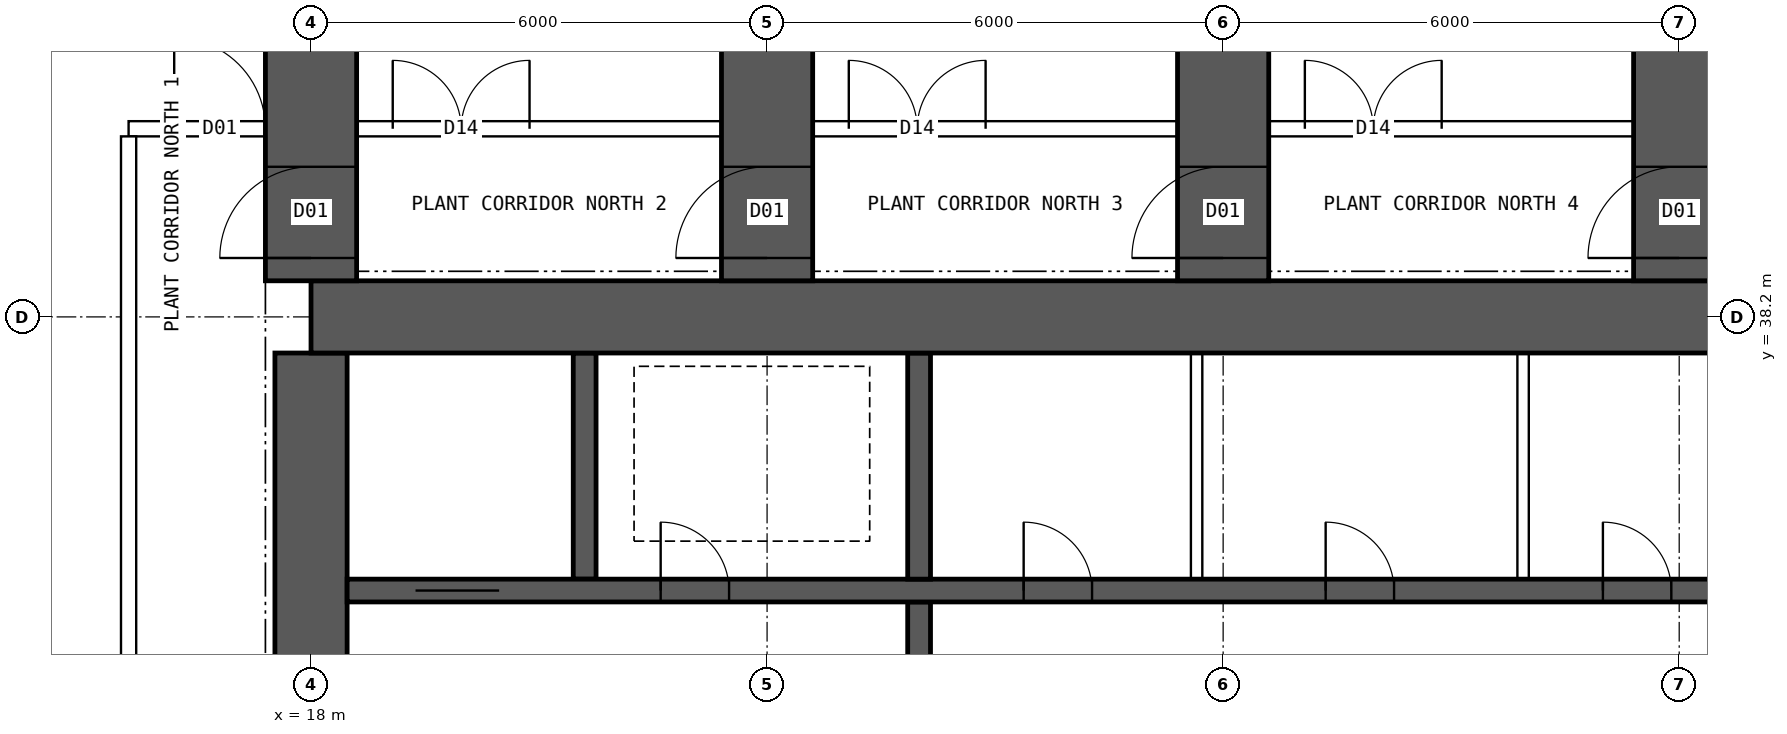
"""IFC4 building model, lengths in metres.
Left out: names, types, materials, properties, quantities, classifications, styles, units other than length and angle.
Written with IfcOpenShell. Run it as: python <this file> out.ifc"""

import sys

from ifc_helpers import new_model, si_unit, direction, frame, frame_2d, origin, place, context, subcontext, project, spatial, rectangle, extrude, element, fill, save


model = new_model("IFC4")
c1 = context("Model", 3, precision=1e-05, world=origin(), true_north=direction((0.0, 1.0)))
c2 = subcontext(c1, "Body", "Model", "MODEL_VIEW")
j1 = project(units=[si_unit("LENGTHUNIT", "METRE"), si_unit("PLANEANGLEUNIT", "RADIAN")], contexts=[c1])
p1 = place(None, origin())
s1 = spatial("IfcSite", under=j1, at=p1, CompositionType="ELEMENT")
p2 = place(p1, origin())
s2 = spatial("IfcBuilding", under=s1, at=p2, CompositionType="ELEMENT")
p3 = place(p2, frame((0.0, 0.0, 133.15)))
s3 = spatial("IfcBuildingStorey", under=s2, at=p3, CompositionType="ELEMENT", Elevation=133.15)
p4 = place(p3, frame((18.0, 38.2, 0.0), z_axis=(0.0, 0.0, 1.0), x_axis=(1.0, 0.0, 0.0)))
e1 = element("IfcWall", 1, at=p4, inside=s3, PredefinedType="SHEAR", context=c2, shape_type="SweptSolid", body=[
    extrude(rectangle(XDim=48.0, YDim=0.95, at=frame_2d((24.0, 0.0))), origin(), (0.0, 0.0, 1.0), 7.2),
])
p5 = place(p3, frame((18.0, 26.275, 0.0), z_axis=(0.0, 0.0, 1.0), x_axis=(0.0, 1.0, 0.0)))
e2 = element("IfcWall", 2, at=p5, inside=s3, PredefinedType="SHEAR", context=c2, shape_type="SweptSolid", body=[
    extrude(rectangle(XDim=11.45, YDim=0.95, at=frame_2d((5.725, 0.0))), origin(), (0.0, 0.0, 1.0), 7.2),
])
p6 = place(p5, frame((5.025, 0.0, 0.0)))
e3 = element("IfcOpeningElement", 3, at=p6, cuts=e2, PredefinedType="OPENING", context=c2, shape_type="SweptSolid", body=[
    extrude(rectangle(XDim=1.2, YDim=2.1, at=frame_2d((0.6, 1.05))), frame((0.0, 0.485, 0.0), z_axis=(0.0, -1.0, 0.0), x_axis=(1.0, 0.0, 0.0)), (0.0, 0.0, 1.0), 0.97),
])
p7 = place(p3, frame((18.475, 34.6, 0.0), z_axis=(0.0, 0.0, 1.0), x_axis=(1.0, 0.0, 0.0)))
e4 = element("IfcWall", 4, at=p7, inside=s3, PredefinedType="SHEAR", context=c2, shape_type="SweptSolid", body=[
    extrude(rectangle(XDim=47.05, YDim=0.3, at=frame_2d((23.525, 0.0))), origin(), (0.0, 0.0, 1.0), 7.2),
])
p8 = place(p7, frame((0.9, 0.0, 0.0)))
e5 = element("IfcOpeningElement", 5, at=p8, cuts=e4, PredefinedType="OPENING", context=c2, shape_type="SweptSolid", body=[
    extrude(rectangle(XDim=1.1, YDim=2.1, at=frame_2d((0.55, 1.05))), frame((0.0, 0.16, 0.0), z_axis=(0.0, -1.0, 0.0), x_axis=(1.0, 0.0, 0.0)), (0.0, 0.0, 1.0), 0.32),
])
p9 = place(p7, frame((45.05, 0.0, 0.0)))
e6 = element("IfcOpeningElement", 6, at=p9, cuts=e4, PredefinedType="OPENING", context=c2, shape_type="SweptSolid", body=[
    extrude(rectangle(XDim=1.1, YDim=2.1, at=frame_2d((0.55, 1.05))), frame((0.0, 0.16, 0.0), z_axis=(0.0, -1.0, 0.0), x_axis=(1.0, 0.0, 0.0)), (0.0, 0.0, 1.0), 0.32),
])
p10 = place(p7, frame((4.125, 0.0, 0.0)))
e7 = element("IfcOpeningElement", 7, at=p10, cuts=e4, PredefinedType="OPENING", context=c2, shape_type="SweptSolid", body=[
    extrude(rectangle(XDim=0.9, YDim=2.1, at=frame_2d((0.45, 1.05))), frame((0.0, 0.16, 0.0), z_axis=(0.0, -1.0, 0.0), x_axis=(1.0, 0.0, 0.0)), (0.0, 0.0, 1.0), 0.32),
])
p11 = place(p7, frame((42.025, 0.0, 0.0)))
e8 = element("IfcOpeningElement", 8, at=p11, cuts=e4, PredefinedType="OPENING", context=c2, shape_type="SweptSolid", body=[
    extrude(rectangle(XDim=0.9, YDim=2.1, at=frame_2d((0.45, 1.05))), frame((0.0, 0.16, 0.0), z_axis=(0.0, -1.0, 0.0), x_axis=(1.0, 0.0, 0.0)), (0.0, 0.0, 1.0), 0.32),
])
p12 = place(p7, frame((8.9, 0.0, 0.0)))
e9 = element("IfcOpeningElement", 9, at=p12, cuts=e4, PredefinedType="OPENING", context=c2, shape_type="SweptSolid", body=[
    extrude(rectangle(XDim=0.9, YDim=2.1, at=frame_2d((0.45, 1.05))), frame((0.0, 0.16, 0.0), z_axis=(0.0, -1.0, 0.0), x_axis=(1.0, 0.0, 0.0)), (0.0, 0.0, 1.0), 0.32),
])
p13 = place(p7, frame((12.874, 0.0, 0.0)))
e10 = element("IfcOpeningElement", 10, at=p13, cuts=e4, PredefinedType="OPENING", context=c2, shape_type="SweptSolid", body=[
    extrude(rectangle(XDim=0.9, YDim=2.1, at=frame_2d((0.45, 1.05))), frame((0.0, 0.16, 0.0), z_axis=(0.0, -1.0, 0.0), x_axis=(1.0, 0.0, 0.0)), (0.0, 0.0, 1.0), 0.32),
])
p14 = place(p7, frame((16.521, 0.0, 0.0)))
e11 = element("IfcOpeningElement", 11, at=p14, cuts=e4, PredefinedType="OPENING", context=c2, shape_type="SweptSolid", body=[
    extrude(rectangle(XDim=0.9, YDim=2.1, at=frame_2d((0.45, 1.05))), frame((0.0, 0.16, 0.0), z_axis=(0.0, -1.0, 0.0), x_axis=(1.0, 0.0, 0.0)), (0.0, 0.0, 1.0), 0.32),
])
p15 = place(p7, frame((20.28, 0.0, 0.0)))
e12 = element("IfcOpeningElement", 12, at=p15, cuts=e4, PredefinedType="OPENING", context=c2, shape_type="SweptSolid", body=[
    extrude(rectangle(XDim=0.9, YDim=2.1, at=frame_2d((0.45, 1.05))), frame((0.0, 0.16, 0.0), z_axis=(0.0, -1.0, 0.0), x_axis=(1.0, 0.0, 0.0)), (0.0, 0.0, 1.0), 0.32),
])
p16 = place(p7, frame((24.686, 0.0, 0.0)))
e13 = element("IfcOpeningElement", 13, at=p16, cuts=e4, PredefinedType="OPENING", context=c2, shape_type="SweptSolid", body=[
    extrude(rectangle(XDim=0.9, YDim=2.1, at=frame_2d((0.45, 1.05))), frame((0.0, 0.16, 0.0), z_axis=(0.0, -1.0, 0.0), x_axis=(1.0, 0.0, 0.0)), (0.0, 0.0, 1.0), 0.32),
])
p17 = place(p7, frame((27.483, 0.0, 0.0)))
e14 = element("IfcOpeningElement", 14, at=p17, cuts=e4, PredefinedType="OPENING", context=c2, shape_type="SweptSolid", body=[
    extrude(rectangle(XDim=0.9, YDim=2.1, at=frame_2d((0.45, 1.05))), frame((0.0, 0.16, 0.0), z_axis=(0.0, -1.0, 0.0), x_axis=(1.0, 0.0, 0.0)), (0.0, 0.0, 1.0), 0.32),
])
p18 = place(p7, frame((33.604, 0.0, 0.0)))
e15 = element("IfcOpeningElement", 15, at=p18, cuts=e4, PredefinedType="OPENING", context=c2, shape_type="SweptSolid", body=[
    extrude(rectangle(XDim=0.9, YDim=2.1, at=frame_2d((0.45, 1.05))), frame((0.0, 0.16, 0.0), z_axis=(0.0, -1.0, 0.0), x_axis=(1.0, 0.0, 0.0)), (0.0, 0.0, 1.0), 0.32),
])
p19 = place(p3, frame((26.0, 30.55, 0.0), z_axis=(0.0, 0.0, 1.0), x_axis=(0.0, 1.0, 0.0)))
e16 = element("IfcWall", 16, at=p19, inside=s3, PredefinedType="SHEAR", context=c2, shape_type="SweptSolid", body=[
    extrude(rectangle(XDim=3.9, YDim=0.3, at=frame_2d((1.95, 0.0))), origin(), (0.0, 0.0, 1.0), 7.2),
])
p20 = place(p19, frame((1.4, 0.0, 0.0)))
e17 = element("IfcOpeningElement", 17, at=p20, cuts=e16, PredefinedType="OPENING", context=c2, shape_type="SweptSolid", body=[
    extrude(rectangle(XDim=1.2, YDim=2.1, at=frame_2d((0.6, 1.05))), frame((0.0, 0.16, 0.0), z_axis=(0.0, -1.0, 0.0), x_axis=(1.0, 0.0, 0.0)), (0.0, 0.0, 1.0), 0.32),
])
for number, where, z_axis, x_axis in (
    (18, (21.6, 34.75, 0.0), (0.0, 0.0, 1.0), (0.0, 1.0, 0.0)),
    (19, (26.0, 34.75, 0.0), (0.0, 0.0, 1.0), (0.0, 1.0, 0.0)),
):
    element("IfcWall", number, at=place(p3, frame(where, z_axis=z_axis, x_axis=x_axis)), inside=s3, PredefinedType="SHEAR", context=c2, shape_type="SweptSolid", body=[
        extrude(rectangle(XDim=2.975, YDim=0.3, at=frame_2d((1.488, 0.0))), origin(), (0.0, 0.0, 1.0), 7.2),
    ])
p21 = place(p3, frame((18.0, 38.675, 0.0), z_axis=(0.0, 0.0, 1.0), x_axis=(0.0, 1.0, 0.0)))
e20 = element("IfcWall", 20, at=p21, inside=s3, PredefinedType="SHEAR", context=c2, shape_type="SweptSolid", body=[
    extrude(rectangle(XDim=16.425, YDim=1.2, at=frame_2d((8.212, 0.0))), origin(), (0.0, 0.0, 1.0), 7.2),
])
p22 = place(p21, frame((0.3, 0.0, 0.0)))
e21 = element("IfcOpeningElement", 21, at=p22, cuts=e20, PredefinedType="OPENING", context=c2, shape_type="SweptSolid", body=[
    extrude(rectangle(XDim=1.2, YDim=2.1, at=frame_2d((0.6, 1.05))), frame((0.0, 0.61, 0.0), z_axis=(0.0, -1.0, 0.0), x_axis=(1.0, 0.0, 0.0)), (0.0, 0.0, 1.0), 1.22),
])
p23 = place(p3, frame((24.0, 38.675, 0.0), z_axis=(0.0, 0.0, 1.0), x_axis=(0.0, 1.0, 0.0)))
e22 = element("IfcWall", 22, at=p23, inside=s3, PredefinedType="SHEAR", context=c2, shape_type="SweptSolid", body=[
    extrude(rectangle(XDim=16.425, YDim=1.2, at=frame_2d((8.212, 0.0))), origin(), (0.0, 0.0, 1.0), 7.2),
])
p24 = place(p23, frame((0.3, 0.0, 0.0)))
e23 = element("IfcOpeningElement", 23, at=p24, cuts=e22, PredefinedType="OPENING", context=c2, shape_type="SweptSolid", body=[
    extrude(rectangle(XDim=1.2, YDim=2.1, at=frame_2d((0.6, 1.05))), frame((0.0, 0.61, 0.0), z_axis=(0.0, -1.0, 0.0), x_axis=(1.0, 0.0, 0.0)), (0.0, 0.0, 1.0), 1.22),
])
p25 = place(p3, frame((30.0, 38.675, 0.0), z_axis=(0.0, 0.0, 1.0), x_axis=(0.0, 1.0, 0.0)))
e24 = element("IfcWall", 24, at=p25, inside=s3, PredefinedType="SHEAR", context=c2, shape_type="SweptSolid", body=[
    extrude(rectangle(XDim=16.425, YDim=1.2, at=frame_2d((8.212, 0.0))), origin(), (0.0, 0.0, 1.0), 7.2),
])
p26 = place(p25, frame((0.3, 0.0, 0.0)))
e25 = element("IfcOpeningElement", 25, at=p26, cuts=e24, PredefinedType="OPENING", context=c2, shape_type="SweptSolid", body=[
    extrude(rectangle(XDim=1.2, YDim=2.1, at=frame_2d((0.6, 1.05))), frame((0.0, 0.61, 0.0), z_axis=(0.0, -1.0, 0.0), x_axis=(1.0, 0.0, 0.0)), (0.0, 0.0, 1.0), 1.22),
])
p27 = place(p3, frame((36.0, 38.675, 0.0), z_axis=(0.0, 0.0, 1.0), x_axis=(0.0, 1.0, 0.0)))
e26 = element("IfcWall", 26, at=p27, inside=s3, PredefinedType="SHEAR", context=c2, shape_type="SweptSolid", body=[
    extrude(rectangle(XDim=16.425, YDim=1.2, at=frame_2d((8.212, 0.0))), origin(), (0.0, 0.0, 1.0), 7.2),
])
p28 = place(p27, frame((0.3, 0.0, 0.0)))
e27 = element("IfcOpeningElement", 27, at=p28, cuts=e26, PredefinedType="OPENING", context=c2, shape_type="SweptSolid", body=[
    extrude(rectangle(XDim=1.2, YDim=2.1, at=frame_2d((0.6, 1.05))), frame((0.0, 0.61, 0.0), z_axis=(0.0, -1.0, 0.0), x_axis=(1.0, 0.0, 0.0)), (0.0, 0.0, 1.0), 1.22),
])
for number, where, z_axis, x_axis in (
    (28, (29.651, 34.75, 0.0), (0.0, 0.0, 1.0), (0.0, 1.0, 0.0)),
    (29, (33.946, 34.75, 0.0), (0.0, 0.0, 1.0), (0.0, 1.0, 0.0)),
):
    element("IfcWall", number, at=place(p3, frame(where, z_axis=z_axis, x_axis=x_axis)), inside=s3, PredefinedType="SOLIDWALL", context=c2, shape_type="SweptSolid", body=[
        extrude(rectangle(XDim=2.975, YDim=0.15, at=frame_2d((1.488, 0.0))), origin(), (0.0, 0.0, 1.0), 6.9),
    ])
p29 = place(p3, frame((15.6, 40.675, 0.0), z_axis=(0.0, 0.0, 1.0), x_axis=(1.0, 0.0, 0.0)))
e30 = element("IfcWall", 30, at=p29, inside=s3, PredefinedType="SOLIDWALL", context=c2, shape_type="SweptSolid", body=[
    extrude(rectangle(XDim=52.8, YDim=0.2, at=frame_2d((26.4, 0.0))), origin(), (0.0, 0.0, 1.0), 6.9),
])
p30 = place(p29, frame((0.6, 0.0, 0.0)))
e31 = element("IfcOpeningElement", 31, at=p30, cuts=e30, PredefinedType="OPENING", context=c2, shape_type="SweptSolid", body=[
    extrude(rectangle(XDim=1.2, YDim=2.1, at=frame_2d((0.6, 1.05))), frame((0.0, 0.11, 0.0), z_axis=(0.0, -1.0, 0.0), x_axis=(1.0, 0.0, 0.0)), (0.0, 0.0, 1.0), 0.22),
])
p31 = place(p29, frame((3.475, 0.0, 0.0)))
e32 = element("IfcOpeningElement", 32, at=p31, cuts=e30, PredefinedType="OPENING", context=c2, shape_type="SweptSolid", body=[
    extrude(rectangle(XDim=1.8, YDim=2.4, at=frame_2d((0.9, 1.2))), frame((0.0, 0.11, 0.0), z_axis=(0.0, -1.0, 0.0), x_axis=(1.0, 0.0, 0.0)), (0.0, 0.0, 1.0), 0.22),
])
p32 = place(p29, frame((9.475, 0.0, 0.0)))
e33 = element("IfcOpeningElement", 33, at=p32, cuts=e30, PredefinedType="OPENING", context=c2, shape_type="SweptSolid", body=[
    extrude(rectangle(XDim=1.8, YDim=2.4, at=frame_2d((0.9, 1.2))), frame((0.0, 0.11, 0.0), z_axis=(0.0, -1.0, 0.0), x_axis=(1.0, 0.0, 0.0)), (0.0, 0.0, 1.0), 0.22),
])
p33 = place(p29, frame((15.475, 0.0, 0.0)))
e34 = element("IfcOpeningElement", 34, at=p33, cuts=e30, PredefinedType="OPENING", context=c2, shape_type="SweptSolid", body=[
    extrude(rectangle(XDim=1.8, YDim=2.4, at=frame_2d((0.9, 1.2))), frame((0.0, 0.11, 0.0), z_axis=(0.0, -1.0, 0.0), x_axis=(1.0, 0.0, 0.0)), (0.0, 0.0, 1.0), 0.22),
])
p34 = place(p29, frame((21.475, 0.0, 0.0)))
e35 = element("IfcOpeningElement", 35, at=p34, cuts=e30, PredefinedType="OPENING", context=c2, shape_type="SweptSolid", body=[
    extrude(rectangle(XDim=1.8, YDim=2.4, at=frame_2d((0.9, 1.2))), frame((0.0, 0.11, 0.0), z_axis=(0.0, -1.0, 0.0), x_axis=(1.0, 0.0, 0.0)), (0.0, 0.0, 1.0), 0.22),
])
p35 = place(p29, frame((27.475, 0.0, 0.0)))
e36 = element("IfcOpeningElement", 36, at=p35, cuts=e30, PredefinedType="OPENING", context=c2, shape_type="SweptSolid", body=[
    extrude(rectangle(XDim=1.8, YDim=2.4, at=frame_2d((0.9, 1.2))), frame((0.0, 0.11, 0.0), z_axis=(0.0, -1.0, 0.0), x_axis=(1.0, 0.0, 0.0)), (0.0, 0.0, 1.0), 0.22),
])
p36 = place(p29, frame((33.475, 0.0, 0.0)))
e37 = element("IfcOpeningElement", 37, at=p36, cuts=e30, PredefinedType="OPENING", context=c2, shape_type="SweptSolid", body=[
    extrude(rectangle(XDim=1.8, YDim=2.4, at=frame_2d((0.9, 1.2))), frame((0.0, 0.11, 0.0), z_axis=(0.0, -1.0, 0.0), x_axis=(1.0, 0.0, 0.0)), (0.0, 0.0, 1.0), 0.22),
])
p37 = place(p29, frame((39.475, 0.0, 0.0)))
e38 = element("IfcOpeningElement", 38, at=p37, cuts=e30, PredefinedType="OPENING", context=c2, shape_type="SweptSolid", body=[
    extrude(rectangle(XDim=1.8, YDim=2.4, at=frame_2d((0.9, 1.2))), frame((0.0, 0.11, 0.0), z_axis=(0.0, -1.0, 0.0), x_axis=(1.0, 0.0, 0.0)), (0.0, 0.0, 1.0), 0.22),
])
p38 = place(p29, frame((45.475, 0.0, 0.0)))
e39 = element("IfcOpeningElement", 39, at=p38, cuts=e30, PredefinedType="OPENING", context=c2, shape_type="SweptSolid", body=[
    extrude(rectangle(XDim=1.8, YDim=2.4, at=frame_2d((0.9, 1.2))), frame((0.0, 0.11, 0.0), z_axis=(0.0, -1.0, 0.0), x_axis=(1.0, 0.0, 0.0)), (0.0, 0.0, 1.0), 0.22),
])
p39 = place(p29, frame((51.475, 0.0, 0.0)))
e40 = element("IfcOpeningElement", 40, at=p39, cuts=e30, PredefinedType="OPENING", context=c2, shape_type="SweptSolid", body=[
    extrude(rectangle(XDim=1.2, YDim=2.1, at=frame_2d((0.6, 1.05))), frame((0.0, 0.11, 0.0), z_axis=(0.0, -1.0, 0.0), x_axis=(1.0, 0.0, 0.0)), (0.0, 0.0, 1.0), 0.22),
])
p40 = place(p3, frame((15.6, 23.425, 0.0), z_axis=(0.0, 0.0, 1.0), x_axis=(0.0, 1.0, 0.0)))
e41 = element("IfcWall", 41, at=p40, inside=s3, PredefinedType="SOLIDWALL", context=c2, shape_type="SweptSolid", body=[
    extrude(rectangle(XDim=17.15, YDim=0.2, at=frame_2d((8.575, 0.0))), origin(), (0.0, 0.0, 1.0), 6.9),
])
p41 = place(p8, origin())
e42 = element("IfcDoor", 42, at=p41, inside=s3, OperationType="DOUBLE_DOOR_SLIDING", PredefinedType="DOOR", context=c2, shape_type="SweptSolid", body=[
    extrude(rectangle(XDim=1.1, YDim=2.1, at=frame_2d((0.55, 1.05))), frame((0.0, 0.025, 0.0), z_axis=(0.0, -1.0, 0.0), x_axis=(1.0, 0.0, 0.0)), (0.0, 0.0, 1.0), 0.05),
])
fill(e5, e42)
p42 = place(p10, origin())
e43 = element("IfcDoor", 43, at=p42, inside=s3, OperationType="SINGLE_SWING_LEFT", PredefinedType="DOOR", context=c2, shape_type="SweptSolid", body=[
    extrude(rectangle(XDim=0.9, YDim=2.1, at=frame_2d((0.45, 1.05))), frame((0.0, 0.025, 0.0), z_axis=(0.0, -1.0, 0.0), x_axis=(1.0, 0.0, 0.0)), (0.0, 0.0, 1.0), 0.05),
])
fill(e7, e43)
p43 = place(p12, origin())
e44 = element("IfcDoor", 44, at=p43, inside=s3, OperationType="SINGLE_SWING_LEFT", PredefinedType="DOOR", context=c2, shape_type="SweptSolid", body=[
    extrude(rectangle(XDim=0.9, YDim=2.1, at=frame_2d((0.45, 1.05))), frame((0.0, 0.025, 0.0), z_axis=(0.0, -1.0, 0.0), x_axis=(1.0, 0.0, 0.0)), (0.0, 0.0, 1.0), 0.05),
])
fill(e9, e44)
p44 = place(p13, origin())
e45 = element("IfcDoor", 45, at=p44, inside=s3, OperationType="SINGLE_SWING_LEFT", PredefinedType="DOOR", context=c2, shape_type="SweptSolid", body=[
    extrude(rectangle(XDim=0.9, YDim=2.1, at=frame_2d((0.45, 1.05))), frame((0.0, 0.025, 0.0), z_axis=(0.0, -1.0, 0.0), x_axis=(1.0, 0.0, 0.0)), (0.0, 0.0, 1.0), 0.05),
])
fill(e10, e45)
p45 = place(p14, origin())
e46 = element("IfcDoor", 46, at=p45, inside=s3, OperationType="SINGLE_SWING_LEFT", PredefinedType="DOOR", context=c2, shape_type="SweptSolid", body=[
    extrude(rectangle(XDim=0.9, YDim=2.1, at=frame_2d((0.45, 1.05))), frame((0.0, 0.025, 0.0), z_axis=(0.0, -1.0, 0.0), x_axis=(1.0, 0.0, 0.0)), (0.0, 0.0, 1.0), 0.05),
])
fill(e11, e46)
p46 = place(p30, origin())
e47 = element("IfcDoor", 47, at=p46, inside=s3, OperationType="SINGLE_SWING_LEFT", PredefinedType="DOOR", context=c2, shape_type="SweptSolid", body=[
    extrude(rectangle(XDim=1.2, YDim=2.1, at=frame_2d((0.6, 1.05))), frame((0.0, 0.025, 0.0), z_axis=(0.0, -1.0, 0.0), x_axis=(1.0, 0.0, 0.0)), (0.0, 0.0, 1.0), 0.05),
])
fill(e31, e47)
p47 = place(p31, origin())
e48 = element("IfcDoor", 48, at=p47, inside=s3, OperationType="DOUBLE_DOOR_SINGLE_SWING", PredefinedType="DOOR", context=c2, shape_type="SweptSolid", body=[
    extrude(rectangle(XDim=1.8, YDim=2.4, at=frame_2d((0.9, 1.2))), frame((0.0, 0.025, 0.0), z_axis=(0.0, -1.0, 0.0), x_axis=(1.0, 0.0, 0.0)), (0.0, 0.0, 1.0), 0.05),
])
fill(e32, e48)
p48 = place(p32, origin())
e49 = element("IfcDoor", 49, at=p48, inside=s3, OperationType="DOUBLE_DOOR_SINGLE_SWING", PredefinedType="DOOR", context=c2, shape_type="SweptSolid", body=[
    extrude(rectangle(XDim=1.8, YDim=2.4, at=frame_2d((0.9, 1.2))), frame((0.0, 0.025, 0.0), z_axis=(0.0, -1.0, 0.0), x_axis=(1.0, 0.0, 0.0)), (0.0, 0.0, 1.0), 0.05),
])
fill(e33, e49)
p49 = place(p33, origin())
e50 = element("IfcDoor", 50, at=p49, inside=s3, OperationType="DOUBLE_DOOR_SINGLE_SWING", PredefinedType="DOOR", context=c2, shape_type="SweptSolid", body=[
    extrude(rectangle(XDim=1.8, YDim=2.4, at=frame_2d((0.9, 1.2))), frame((0.0, 0.025, 0.0), z_axis=(0.0, -1.0, 0.0), x_axis=(1.0, 0.0, 0.0)), (0.0, 0.0, 1.0), 0.05),
])
fill(e34, e50)
p50 = place(p22, origin())
e51 = element("IfcDoor", 51, at=p50, inside=s3, OperationType="SINGLE_SWING_LEFT", PredefinedType="DOOR", context=c2, shape_type="SweptSolid", body=[
    extrude(rectangle(XDim=1.2, YDim=2.1, at=frame_2d((0.6, 1.05))), frame((0.0, 0.025, 0.0), z_axis=(0.0, -1.0, 0.0), x_axis=(1.0, 0.0, 0.0)), (0.0, 0.0, 1.0), 0.05),
])
fill(e21, e51)
p51 = place(p24, origin())
e52 = element("IfcDoor", 52, at=p51, inside=s3, OperationType="SINGLE_SWING_LEFT", PredefinedType="DOOR", context=c2, shape_type="SweptSolid", body=[
    extrude(rectangle(XDim=1.2, YDim=2.1, at=frame_2d((0.6, 1.05))), frame((0.0, 0.025, 0.0), z_axis=(0.0, -1.0, 0.0), x_axis=(1.0, 0.0, 0.0)), (0.0, 0.0, 1.0), 0.05),
])
fill(e23, e52)
p52 = place(p26, origin())
e53 = element("IfcDoor", 53, at=p52, inside=s3, OperationType="SINGLE_SWING_LEFT", PredefinedType="DOOR", context=c2, shape_type="SweptSolid", body=[
    extrude(rectangle(XDim=1.2, YDim=2.1, at=frame_2d((0.6, 1.05))), frame((0.0, 0.025, 0.0), z_axis=(0.0, -1.0, 0.0), x_axis=(1.0, 0.0, 0.0)), (0.0, 0.0, 1.0), 0.05),
])
fill(e25, e53)
p53 = place(p28, origin())
e54 = element("IfcDoor", 54, at=p53, inside=s3, OperationType="SINGLE_SWING_LEFT", PredefinedType="DOOR", context=c2, shape_type="SweptSolid", body=[
    extrude(rectangle(XDim=1.2, YDim=2.1, at=frame_2d((0.6, 1.05))), frame((0.0, 0.025, 0.0), z_axis=(0.0, -1.0, 0.0), x_axis=(1.0, 0.0, 0.0)), (0.0, 0.0, 1.0), 0.05),
])
fill(e27, e54)
save(model, sys.argv[1])
